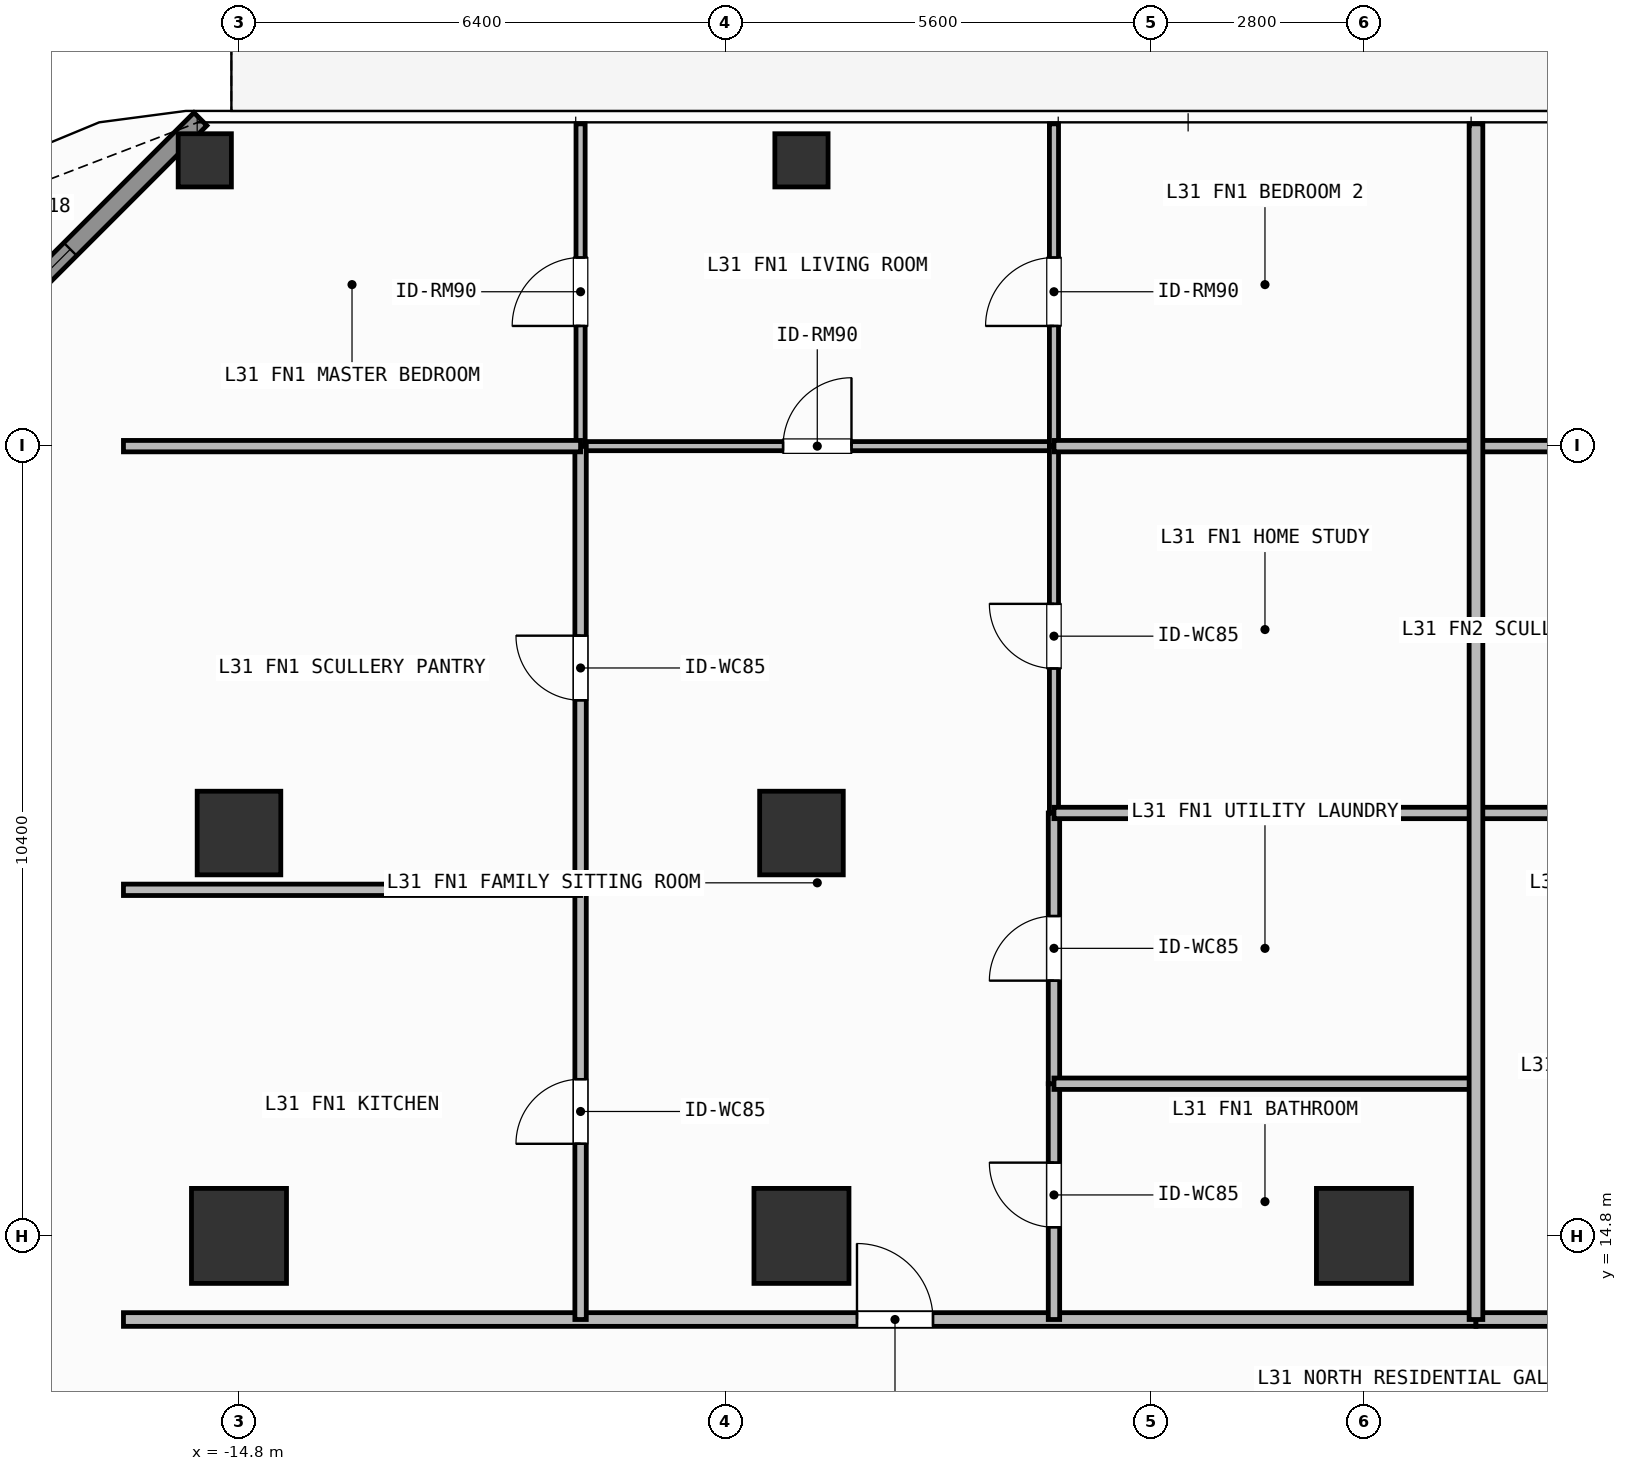
"""IFC4 building model, lengths in metres.
Left out: names, types, materials, properties, quantities, classifications, styles, units other than length and angle.
Written with IfcOpenShell. Run it as: python <this file> out.ifc"""

import sys

from ifc_helpers import new_model, si_unit, direction, frame, frame_2d, origin, origin_2d, place, context, subcontext, project, spatial, rectangle, hollow_rectangle, extrude, element, fill, save


model = new_model("IFC4")
c1 = context("Model", 3, precision=1e-05, world=origin(), true_north=direction((0.0, 1.0)))
c2 = subcontext(c1, "Body", "Model", "MODEL_VIEW")
j1 = project(units=[si_unit("LENGTHUNIT", "METRE"), si_unit("PLANEANGLEUNIT", "RADIAN")], contexts=[c1])
p1 = place(None, origin())
s1 = spatial("IfcSite", under=j1, at=p1, CompositionType="ELEMENT")
p2 = place(p1, origin())
s2 = spatial("IfcBuilding", under=s1, at=p2, CompositionType="ELEMENT")
p3 = place(p2, frame((0.0, 0.0, 125.1)))
s3 = spatial("IfcBuildingStorey", under=s2, at=p3, CompositionType="ELEMENT", Elevation=125.1)
for number, where, z_axis, x_axis in (
    (1, (-14.8, 14.8, 0.0), (0.0, 0.0, 1.0), (1.0, 0.0, 0.0)),
    (2, (-7.4, 14.8, 0.0), (0.0, 0.0, 1.0), (1.0, 0.0, 0.0)),
    (3, (0.0, 14.8, 0.0), (0.0, 0.0, 1.0), (1.0, 0.0, 0.0)),
):
    element("IfcColumn", number, at=place(p3, frame(where, z_axis=z_axis, x_axis=x_axis)), inside=s3, PredefinedType="COLUMN", context=c2, shape_type="SweptSolid", body=[
        extrude(rectangle(XDim=1.25, YDim=1.25, at=origin_2d()), origin(), (0.0, 0.0, 1.0), 3.9),
    ])
for number, where, z_axis, x_axis in (
    (4, (-14.8, 20.1, 0.0), (0.0, 0.0, 1.0), (1.0, 0.0, 0.0)),
    (5, (-7.4, 20.1, 0.0), (0.0, 0.0, 1.0), (1.0, 0.0, 0.0)),
):
    element("IfcColumn", number, at=place(p3, frame(where, z_axis=z_axis, x_axis=x_axis)), inside=s3, PredefinedType="COLUMN", context=c2, shape_type="SweptSolid", body=[
        extrude(rectangle(XDim=1.1, YDim=1.1, at=origin_2d()), origin(), (0.0, 0.0, 1.0), 3.9),
    ])
for number, where, z_axis, x_axis in (
    (6, (-15.25, 28.95, 0.0), (0.0, 0.0, 1.0), (1.0, 0.0, 0.0)),
    (7, (-7.4, 28.95, 0.0), (0.0, 0.0, 1.0), (1.0, 0.0, 0.0)),
):
    element("IfcColumn", number, at=place(p3, frame(where, z_axis=z_axis, x_axis=x_axis)), inside=s3, PredefinedType="COLUMN", context=c2, shape_type="SweptSolid", body=[
        extrude(hollow_rectangle(XDim=0.7, YDim=0.7, WallThickness=0.032, at=origin_2d()), origin(), (0.0, 0.0, 1.0), 3.9),
    ])
p4 = place(p3, frame((-19.792, 25.008, 0.0), z_axis=(0.0, 0.0, 1.0), x_axis=(0.707106781187, 0.707106781187, 0.0)))
e8 = element("IfcWall", 8, at=p4, inside=s3, PredefinedType="SOLIDWALL", context=c2, shape_type="SweptSolid", body=[
    extrude(rectangle(XDim=6.343, YDim=0.24, at=frame_2d((3.171, 0.0))), origin(), (0.0, 0.0, 1.0), 3.68),
])
p5 = place(p4, frame((2.421, 0.0, 0.8)))
e9 = element("IfcOpeningElement", 9, at=p5, cuts=e8, PredefinedType="OPENING", context=c2, shape_type="SweptSolid", body=[
    extrude(rectangle(XDim=1.5, YDim=1.85, at=frame_2d((0.75, 0.925))), frame((0.0, 0.13, 0.0), z_axis=(0.0, -1.0, 0.0), x_axis=(1.0, 0.0, 0.0)), (0.0, 0.0, 1.0), 0.26),
])
p6 = place(p3, frame((-16.32, 13.7, 0.0), z_axis=(0.0, 0.0, 1.0), x_axis=(1.0, 0.0, 0.0)))
e10 = element("IfcWall", 10, at=p6, inside=s3, PredefinedType="PARTITIONING", context=c2, shape_type="SweptSolid", body=[
    extrude(rectangle(XDim=17.794, YDim=0.18, at=frame_2d((8.897, 0.0))), origin(), (0.0, 0.0, 1.0), 3.68),
])
p7 = place(p6, frame((9.65, 0.0, 0.0)))
e11 = element("IfcOpeningElement", 11, at=p7, cuts=e10, PredefinedType="OPENING", context=c2, shape_type="SweptSolid", body=[
    extrude(rectangle(XDim=1.0, YDim=2.2, at=frame_2d((0.5, 1.1))), frame((0.0, 0.1, 0.0), z_axis=(0.0, -1.0, 0.0), x_axis=(1.0, 0.0, 0.0)), (0.0, 0.0, 1.0), 0.2),
])
p8 = place(p3, frame((-10.306, 25.19, 0.0), z_axis=(0.0, 0.0, 1.0), x_axis=(1.0, 0.0, 0.0)))
e12 = element("IfcWall", 12, at=p8, inside=s3, PredefinedType="PARTITIONING", context=c2, shape_type="SweptSolid", body=[
    extrude(rectangle(XDim=6.228, YDim=0.12, at=frame_2d((3.114, 0.0))), origin(), (0.0, 0.0, 1.0), 3.68),
])
p9 = place(p8, frame((2.664, 0.0, 0.0)))
e13 = element("IfcOpeningElement", 13, at=p9, cuts=e12, PredefinedType="OPENING", context=c2, shape_type="SweptSolid", body=[
    extrude(rectangle(XDim=0.9, YDim=2.1, at=frame_2d((0.45, 1.05))), frame((0.0, 0.07, 0.0), z_axis=(0.0, -1.0, 0.0), x_axis=(1.0, 0.0, 0.0)), (0.0, 0.0, 1.0), 0.14),
])
p10 = place(p3, frame((-10.306, 13.7, 0.0), z_axis=(0.0, 0.0, 1.0), x_axis=(0.0, 1.0, 0.0)))
e14 = element("IfcWall", 14, at=p10, inside=s3, PredefinedType="PARTITIONING", context=c2, shape_type="SweptSolid", body=[
    extrude(rectangle(XDim=5.653, YDim=0.15, at=frame_2d((2.827, 0.0))), origin(), (0.0, 0.0, 1.0), 3.68),
])
p11 = place(p10, frame((2.312, 0.0, 0.0)))
e15 = element("IfcOpeningElement", 15, at=p11, cuts=e14, PredefinedType="OPENING", context=c2, shape_type="SweptSolid", body=[
    extrude(rectangle(XDim=0.85, YDim=2.1, at=frame_2d((0.425, 1.05))), frame((0.0, 0.085, 0.0), z_axis=(0.0, -1.0, 0.0), x_axis=(1.0, 0.0, 0.0)), (0.0, 0.0, 1.0), 0.17),
])
p12 = place(p3, frame((-10.306, 19.353, 0.0), z_axis=(0.0, 0.0, 1.0), x_axis=(0.0, 1.0, 0.0)))
e16 = element("IfcWall", 16, at=p12, inside=s3, PredefinedType="PARTITIONING", context=c2, shape_type="SweptSolid", body=[
    extrude(rectangle(XDim=5.837, YDim=0.15, at=frame_2d((2.918, 0.0))), origin(), (0.0, 0.0, 1.0), 3.68),
])
p13 = place(p12, frame((2.493, 0.0, 0.0)))
e17 = element("IfcOpeningElement", 17, at=p13, cuts=e16, PredefinedType="OPENING", context=c2, shape_type="SweptSolid", body=[
    extrude(rectangle(XDim=0.85, YDim=2.1, at=frame_2d((0.425, 1.05))), frame((0.0, 0.085, 0.0), z_axis=(0.0, -1.0, 0.0), x_axis=(1.0, 0.0, 0.0)), (0.0, 0.0, 1.0), 0.17),
])
p14 = place(p3, frame((-10.306, 25.19, 0.0), z_axis=(0.0, 0.0, 1.0), x_axis=(0.0, 1.0, 0.0)))
e18 = element("IfcWall", 18, at=p14, inside=s3, PredefinedType="PARTITIONING", context=c2, shape_type="SweptSolid", body=[
    extrude(rectangle(XDim=4.24, YDim=0.12, at=frame_2d((2.12, 0.0))), origin(), (0.0, 0.0, 1.0), 3.68),
])
p15 = place(p14, frame((1.581, 0.0, 0.0)))
e19 = element("IfcOpeningElement", 19, at=p15, cuts=e18, PredefinedType="OPENING", context=c2, shape_type="SweptSolid", body=[
    extrude(rectangle(XDim=0.9, YDim=2.1, at=frame_2d((0.45, 1.05))), frame((0.0, 0.07, 0.0), z_axis=(0.0, -1.0, 0.0), x_axis=(1.0, 0.0, 0.0)), (0.0, 0.0, 1.0), 0.14),
])
p16 = place(p3, frame((-4.078, 13.7, 0.0), z_axis=(0.0, 0.0, 1.0), x_axis=(0.0, 1.0, 0.0)))
e20 = element("IfcWall", 20, at=p16, inside=s3, PredefinedType="PARTITIONING", context=c2, shape_type="SweptSolid", body=[
    extrude(rectangle(XDim=3.102, YDim=0.15, at=frame_2d((1.551, 0.0))), origin(), (0.0, 0.0, 1.0), 3.68),
])
p17 = place(p16, frame((1.214, 0.0, 0.0)))
e21 = element("IfcOpeningElement", 21, at=p17, cuts=e20, PredefinedType="OPENING", context=c2, shape_type="SweptSolid", body=[
    extrude(rectangle(XDim=0.85, YDim=2.1, at=frame_2d((0.425, 1.05))), frame((0.0, 0.085, 0.0), z_axis=(0.0, -1.0, 0.0), x_axis=(1.0, 0.0, 0.0)), (0.0, 0.0, 1.0), 0.17),
])
p18 = place(p3, frame((-4.078, 16.802, 0.0), z_axis=(0.0, 0.0, 1.0), x_axis=(0.0, 1.0, 0.0)))
e22 = element("IfcWall", 22, at=p18, inside=s3, PredefinedType="PARTITIONING", context=c2, shape_type="SweptSolid", body=[
    extrude(rectangle(XDim=3.562, YDim=0.15, at=frame_2d((1.781, 0.0))), origin(), (0.0, 0.0, 1.0), 3.68),
])
p19 = place(p18, frame((1.356, 0.0, 0.0)))
e23 = element("IfcOpeningElement", 23, at=p19, cuts=e22, PredefinedType="OPENING", context=c2, shape_type="SweptSolid", body=[
    extrude(rectangle(XDim=0.85, YDim=2.1, at=frame_2d((0.425, 1.05))), frame((0.0, 0.085, 0.0), z_axis=(0.0, -1.0, 0.0), x_axis=(1.0, 0.0, 0.0)), (0.0, 0.0, 1.0), 0.17),
])
p20 = place(p3, frame((-4.078, 20.364, 0.0), z_axis=(0.0, 0.0, 1.0), x_axis=(0.0, 1.0, 0.0)))
e24 = element("IfcWall", 24, at=p20, inside=s3, PredefinedType="PARTITIONING", context=c2, shape_type="SweptSolid", body=[
    extrude(rectangle(XDim=4.826, YDim=0.12, at=frame_2d((2.413, 0.0))), origin(), (0.0, 0.0, 1.0), 3.68),
])
p21 = place(p20, frame((1.901, 0.0, 0.0)))
e25 = element("IfcOpeningElement", 25, at=p21, cuts=e24, PredefinedType="OPENING", context=c2, shape_type="SweptSolid", body=[
    extrude(rectangle(XDim=0.85, YDim=2.1, at=frame_2d((0.425, 1.05))), frame((0.0, 0.07, 0.0), z_axis=(0.0, -1.0, 0.0), x_axis=(1.0, 0.0, 0.0)), (0.0, 0.0, 1.0), 0.14),
])
p22 = place(p3, frame((-4.078, 25.19, 0.0), z_axis=(0.0, 0.0, 1.0), x_axis=(0.0, 1.0, 0.0)))
e26 = element("IfcWall", 26, at=p22, inside=s3, PredefinedType="PARTITIONING", context=c2, shape_type="SweptSolid", body=[
    extrude(rectangle(XDim=4.24, YDim=0.12, at=frame_2d((2.12, 0.0))), origin(), (0.0, 0.0, 1.0), 3.68),
])
p23 = place(p22, frame((1.581, 0.0, 0.0)))
e27 = element("IfcOpeningElement", 27, at=p23, cuts=e26, PredefinedType="OPENING", context=c2, shape_type="SweptSolid", body=[
    extrude(rectangle(XDim=0.9, YDim=2.1, at=frame_2d((0.45, 1.05))), frame((0.0, 0.07, 0.0), z_axis=(0.0, -1.0, 0.0), x_axis=(1.0, 0.0, 0.0)), (0.0, 0.0, 1.0), 0.14),
])
p24 = place(p3, frame((1.474, 13.7, 0.0), z_axis=(0.0, 0.0, 1.0), x_axis=(1.0, 0.0, 0.0)))
e28 = element("IfcWall", 28, at=p24, inside=s3, PredefinedType="PARTITIONING", context=c2, shape_type="SweptSolid", body=[
    extrude(rectangle(XDim=22.646, YDim=0.18, at=frame_2d((11.323, 0.0))), origin(), (0.0, 0.0, 1.0), 3.68),
])
p25 = place(p24, frame((10.196, 0.0, 0.0)))
e29 = element("IfcOpeningElement", 29, at=p25, cuts=e28, PredefinedType="OPENING", context=c2, shape_type="SweptSolid", body=[
    extrude(rectangle(XDim=1.0, YDim=2.2, at=frame_2d((0.5, 1.1))), frame((0.0, 0.1, 0.0), z_axis=(0.0, -1.0, 0.0), x_axis=(1.0, 0.0, 0.0)), (0.0, 0.0, 1.0), 0.2),
])
for number, where, z_axis, x_axis in (
    (30, (-16.32, 19.353, 0.0), (0.0, 0.0, 1.0), (1.0, 0.0, 0.0)),
    (31, (-16.32, 25.19, 0.0), (0.0, 0.0, 1.0), (1.0, 0.0, 0.0)),
):
    element("IfcWall", number, at=place(p3, frame(where, z_axis=z_axis, x_axis=x_axis)), inside=s3, PredefinedType="PARTITIONING", context=c2, shape_type="SweptSolid", body=[
        extrude(rectangle(XDim=6.014, YDim=0.15, at=frame_2d((3.007, 0.0))), origin(), (0.0, 0.0, 1.0), 3.68),
    ])
p26 = place(p3, frame((-4.078, 16.802, 0.0), z_axis=(0.0, 0.0, 1.0), x_axis=(1.0, 0.0, 0.0)))
e32 = element("IfcWall", 32, at=p26, inside=s3, PredefinedType="PARTITIONING", context=c2, shape_type="SweptSolid", body=[
    extrude(rectangle(XDim=5.552, YDim=0.15, at=frame_2d((2.776, 0.0))), origin(), (0.0, 0.0, 1.0), 3.68),
])
p27 = place(p3, frame((-4.078, 20.364, 0.0), z_axis=(0.0, 0.0, 1.0), x_axis=(1.0, 0.0, 0.0)))
e33 = element("IfcWall", 33, at=p27, inside=s3, PredefinedType="PARTITIONING", context=c2, shape_type="SweptSolid", body=[
    extrude(rectangle(XDim=5.552, YDim=0.15, at=frame_2d((2.776, 0.0))), origin(), (0.0, 0.0, 1.0), 3.082),
])
p28 = place(p3, frame((-4.078, 25.19, 0.0), z_axis=(0.0, 0.0, 1.0), x_axis=(1.0, 0.0, 0.0)))
e34 = element("IfcWall", 34, at=p28, inside=s3, PredefinedType="PARTITIONING", context=c2, shape_type="SweptSolid", body=[
    extrude(rectangle(XDim=5.552, YDim=0.15, at=frame_2d((2.776, 0.0))), origin(), (0.0, 0.0, 1.0), 3.68),
])
p29 = place(p3, frame((1.474, 20.364, 0.0), z_axis=(0.0, 0.0, 1.0), x_axis=(1.0, 0.0, 0.0)))
e35 = element("IfcWall", 35, at=p29, inside=s3, PredefinedType="PARTITIONING", context=c2, shape_type="SweptSolid", body=[
    extrude(rectangle(XDim=3.964, YDim=0.15, at=frame_2d((1.982, 0.0))), origin(), (0.0, 0.0, 1.0), 3.082),
])
p30 = place(p3, frame((1.474, 25.19, 0.0), z_axis=(0.0, 0.0, 1.0), x_axis=(1.0, 0.0, 0.0)))
e36 = element("IfcWall", 36, at=p30, inside=s3, PredefinedType="PARTITIONING", context=c2, shape_type="SweptSolid", body=[
    extrude(rectangle(XDim=3.964, YDim=0.15, at=frame_2d((1.982, 0.0))), origin(), (0.0, 0.0, 1.0), 3.68),
])
p31 = place(p3, frame((1.474, 13.7, 0.0), z_axis=(0.0, 0.0, 1.0), x_axis=(0.0, 1.0, 0.0)))
e37 = element("IfcWall", 37, at=p31, inside=s3, PredefinedType="PARTITIONING", context=c2, shape_type="SweptSolid", body=[
    extrude(rectangle(XDim=15.73, YDim=0.18, at=frame_2d((7.865, 0.0))), origin(), (0.0, 0.0, 1.0), 3.68),
])
p32 = place(p5, origin())
e38 = element("IfcWindow", 38, at=p32, inside=s3, PartitioningType="SINGLE_PANEL", PredefinedType="WINDOW", context=c2, shape_type="SweptSolid", body=[
    extrude(rectangle(XDim=1.5, YDim=1.85, at=frame_2d((0.75, 0.925))), frame((0.0, 0.03, 0.0), z_axis=(0.0, -1.0, 0.0), x_axis=(1.0, 0.0, 0.0)), (0.0, 0.0, 1.0), 0.06),
])
fill(e9, e38)
p33 = place(p7, origin())
e39 = element("IfcDoor", 39, at=p33, inside=s3, OperationType="SINGLE_SWING_LEFT", PredefinedType="DOOR", context=c2, shape_type="SweptSolid", body=[
    extrude(rectangle(XDim=1.0, YDim=2.2, at=frame_2d((0.5, 1.1))), frame((0.0, 0.025, 0.0), z_axis=(0.0, -1.0, 0.0), x_axis=(1.0, 0.0, 0.0)), (0.0, 0.0, 1.0), 0.05),
])
fill(e11, e39)
p34 = place(p9, origin())
e40 = element("IfcDoor", 40, at=p34, inside=s3, OperationType="SINGLE_SWING_RIGHT", PredefinedType="DOOR", context=c2, shape_type="SweptSolid", body=[
    extrude(rectangle(XDim=0.9, YDim=2.1, at=frame_2d((0.45, 1.05))), frame((0.0, 0.025, 0.0), z_axis=(0.0, -1.0, 0.0), x_axis=(1.0, 0.0, 0.0)), (0.0, 0.0, 1.0), 0.05),
])
fill(e13, e40)
p35 = place(p11, origin())
e41 = element("IfcDoor", 41, at=p35, inside=s3, OperationType="SINGLE_SWING_LEFT", PredefinedType="DOOR", context=c2, shape_type="SweptSolid", body=[
    extrude(rectangle(XDim=0.85, YDim=2.1, at=frame_2d((0.425, 1.05))), frame((0.0, 0.025, 0.0), z_axis=(0.0, -1.0, 0.0), x_axis=(1.0, 0.0, 0.0)), (0.0, 0.0, 1.0), 0.05),
])
fill(e15, e41)
p36 = place(p13, origin())
e42 = element("IfcDoor", 42, at=p36, inside=s3, OperationType="SINGLE_SWING_RIGHT", PredefinedType="DOOR", context=c2, shape_type="SweptSolid", body=[
    extrude(rectangle(XDim=0.85, YDim=2.1, at=frame_2d((0.425, 1.05))), frame((0.0, 0.025, 0.0), z_axis=(0.0, -1.0, 0.0), x_axis=(1.0, 0.0, 0.0)), (0.0, 0.0, 1.0), 0.05),
])
fill(e17, e42)
p37 = place(p15, origin())
e43 = element("IfcDoor", 43, at=p37, inside=s3, OperationType="SINGLE_SWING_LEFT", PredefinedType="DOOR", context=c2, shape_type="SweptSolid", body=[
    extrude(rectangle(XDim=0.9, YDim=2.1, at=frame_2d((0.45, 1.05))), frame((0.0, 0.025, 0.0), z_axis=(0.0, -1.0, 0.0), x_axis=(1.0, 0.0, 0.0)), (0.0, 0.0, 1.0), 0.05),
])
fill(e19, e43)
p38 = place(p17, origin())
e44 = element("IfcDoor", 44, at=p38, inside=s3, OperationType="SINGLE_SWING_RIGHT", PredefinedType="DOOR", context=c2, shape_type="SweptSolid", body=[
    extrude(rectangle(XDim=0.85, YDim=2.1, at=frame_2d((0.425, 1.05))), frame((0.0, 0.025, 0.0), z_axis=(0.0, -1.0, 0.0), x_axis=(1.0, 0.0, 0.0)), (0.0, 0.0, 1.0), 0.05),
])
fill(e21, e44)
p39 = place(p19, origin())
e45 = element("IfcDoor", 45, at=p39, inside=s3, OperationType="SINGLE_SWING_LEFT", PredefinedType="DOOR", context=c2, shape_type="SweptSolid", body=[
    extrude(rectangle(XDim=0.85, YDim=2.1, at=frame_2d((0.425, 1.05))), frame((0.0, 0.025, 0.0), z_axis=(0.0, -1.0, 0.0), x_axis=(1.0, 0.0, 0.0)), (0.0, 0.0, 1.0), 0.05),
])
fill(e23, e45)
p40 = place(p21, origin())
e46 = element("IfcDoor", 46, at=p40, inside=s3, OperationType="SINGLE_SWING_RIGHT", PredefinedType="DOOR", context=c2, shape_type="SweptSolid", body=[
    extrude(rectangle(XDim=0.85, YDim=2.1, at=frame_2d((0.425, 1.05))), frame((0.0, 0.025, 0.0), z_axis=(0.0, -1.0, 0.0), x_axis=(1.0, 0.0, 0.0)), (0.0, 0.0, 1.0), 0.05),
])
fill(e25, e46)
p41 = place(p23, origin())
e47 = element("IfcDoor", 47, at=p41, inside=s3, OperationType="SINGLE_SWING_LEFT", PredefinedType="DOOR", context=c2, shape_type="SweptSolid", body=[
    extrude(rectangle(XDim=0.9, YDim=2.1, at=frame_2d((0.45, 1.05))), frame((0.0, 0.025, 0.0), z_axis=(0.0, -1.0, 0.0), x_axis=(1.0, 0.0, 0.0)), (0.0, 0.0, 1.0), 0.05),
])
fill(e27, e47)
save(model, sys.argv[1])
